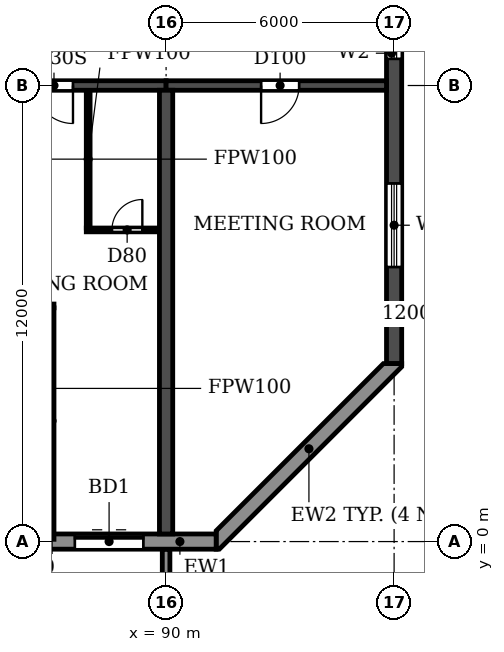
"""IFC4 building model, lengths in metres.
Left out: names, types, materials, properties, quantities, classifications, styles, units other than length and angle.
Written with IfcOpenShell. Run it as: python <this file> out.ifc"""

import sys

from ifc_helpers import new_model, si_unit, direction, frame, frame_2d, origin, place, context, subcontext, project, spatial, polyline, rectangle, outline, extrude, source, transform, mapped, element, fill, save


model = new_model("IFC4")
c1 = context("Model", 3, precision=1e-05, world=origin(), true_north=direction((0.0, 1.0)))
c2 = subcontext(c1, "Body", "Model", "MODEL_VIEW")
j1 = project(units=[si_unit("LENGTHUNIT", "METRE"), si_unit("PLANEANGLEUNIT", "RADIAN")], contexts=[c1])
p1 = place(None, origin())
s1 = spatial("IfcSite", under=j1, at=p1, CompositionType="ELEMENT")
p2 = place(p1, origin())
s2 = spatial("IfcBuilding", under=s1, at=p2, CompositionType="ELEMENT")
p3 = place(p2, frame((0.0, 0.0, 102.6)))
s3 = spatial("IfcBuildingStorey", under=s2, at=p3, CompositionType="ELEMENT", Elevation=102.6)
p4 = place(p3, frame((90.0, 0.2, 0.0), z_axis=(0.0, 0.0, 1.0), x_axis=(0.0, 1.0, 0.0)))
e1 = element("IfcWall", 1, at=p4, inside=s3, PredefinedType="SHEAR", context=c2, shape_type="SweptSolid", body=[
    extrude(rectangle(XDim=11.675, YDim=0.35, at=frame_2d((5.837, 0.0))), origin(), (0.0, 0.0, 1.0), 3.0),
])
p5 = place(p3, frame((96.0, 4.683, 0.0), z_axis=(0.0, 0.0, 1.0), x_axis=(0.0, 1.0, 0.0)))
e2 = element("IfcWall", 2, at=p5, inside=s3, PredefinedType="SHEAR", context=c2, shape_type="SweptSolid", body=[
    extrude(rectangle(XDim=34.234, YDim=0.4, at=frame_2d((17.117, 0.0))), origin(), (0.0, 0.0, 1.0), 3.0),
])
p6 = place(p5, frame((15.917, 0.0, 0.9)))
e3 = element("IfcOpeningElement", 3, at=p6, cuts=e2, PredefinedType="OPENING", context=c2, shape_type="SweptSolid", body=[
    extrude(rectangle(XDim=1.2, YDim=1.5, at=frame_2d((0.6, 0.75))), frame((0.0, 0.21, 0.0), z_axis=(0.0, -1.0, 0.0), x_axis=(1.0, 0.0, 0.0)), (0.0, 0.0, 1.0), 0.42),
])
p7 = place(p5, frame((23.817, 0.0, 0.9)))
e4 = element("IfcOpeningElement", 4, at=p7, cuts=e2, PredefinedType="OPENING", context=c2, shape_type="SweptSolid", body=[
    extrude(rectangle(XDim=1.2, YDim=1.5, at=frame_2d((0.6, 0.75))), frame((0.0, 0.21, 0.0), z_axis=(0.0, -1.0, 0.0), x_axis=(1.0, 0.0, 0.0)), (0.0, 0.0, 1.0), 0.42),
])
p8 = place(p5, frame((8.017, 0.0, 0.9)))
e5 = element("IfcOpeningElement", 5, at=p8, cuts=e2, PredefinedType="OPENING", context=c2, shape_type="SweptSolid", body=[
    extrude(rectangle(XDim=1.2, YDim=1.5, at=frame_2d((0.6, 0.75))), frame((0.0, 0.21, 0.0), z_axis=(0.0, -1.0, 0.0), x_axis=(1.0, 0.0, 0.0)), (0.0, 0.0, 1.0), 0.42),
])
p9 = place(p5, frame((28.894, 0.0, 0.6)))
e6 = element("IfcOpeningElement", 6, at=p9, cuts=e2, PredefinedType="OPENING", context=c2, shape_type="SweptSolid", body=[
    extrude(rectangle(XDim=2.2, YDim=1.8, at=frame_2d((1.1, 0.9))), frame((0.0, 0.21, 0.0), z_axis=(0.0, -1.0, 0.0), x_axis=(1.0, 0.0, 0.0)), (0.0, 0.0, 1.0), 0.42),
])
p10 = place(p5, frame((2.541, 0.0, 0.6)))
e7 = element("IfcOpeningElement", 7, at=p10, cuts=e2, PredefinedType="OPENING", context=c2, shape_type="SweptSolid", body=[
    extrude(rectangle(XDim=2.2, YDim=1.8, at=frame_2d((1.1, 0.9))), frame((0.0, 0.21, 0.0), z_axis=(0.0, -1.0, 0.0), x_axis=(1.0, 0.0, 0.0)), (0.0, 0.0, 1.0), 0.42),
])
p11 = place(p3, frame((84.0, 12.0, 0.0), z_axis=(0.0, 0.0, 1.0), x_axis=(1.0, 0.0, 0.0)))
e8 = element("IfcWall", 8, at=p11, inside=s3, PredefinedType="SHEAR", context=c2, shape_type="SweptSolid", body=[
    extrude(rectangle(XDim=6.0, YDim=0.25, at=frame_2d((3.0, 0.0))), origin(), (0.0, 0.0, 1.0), 2.4),
])
p12 = place(p11, frame((2.55, 0.0, 0.0)))
e9 = element("IfcOpeningElement", 9, at=p12, cuts=e8, PredefinedType="OPENING", context=c2, shape_type="SweptSolid", body=[
    extrude(rectangle(XDim=1.0, YDim=2.1, at=frame_2d((0.5, 1.05))), frame((0.0, 0.135, 0.0), z_axis=(0.0, -1.0, 0.0), x_axis=(1.0, 0.0, 0.0)), (0.0, 0.0, 1.0), 0.27),
])
p13 = place(p3, frame((90.0, 12.0, 0.0), z_axis=(0.0, 0.0, 1.0), x_axis=(1.0, 0.0, 0.0)))
e10 = element("IfcWall", 10, at=p13, inside=s3, PredefinedType="SHEAR", context=c2, shape_type="SweptSolid", body=[
    extrude(rectangle(XDim=5.8, YDim=0.25, at=frame_2d((2.9, 0.0))), origin(), (0.0, 0.0, 1.0), 2.4),
])
p14 = place(p13, frame((2.5, 0.0, 0.0)))
e11 = element("IfcOpeningElement", 11, at=p14, cuts=e10, PredefinedType="OPENING", context=c2, shape_type="SweptSolid", body=[
    extrude(rectangle(XDim=1.0, YDim=2.1, at=frame_2d((0.5, 1.05))), frame((0.0, 0.135, 0.0), z_axis=(0.0, -1.0, 0.0), x_axis=(1.0, 0.0, 0.0)), (0.0, 0.0, 1.0), 0.27),
])
p15 = place(p3, frame((10.683, 0.0, 0.0), z_axis=(0.0, 0.0, 1.0), x_axis=(1.0, 0.0, 0.0)))
e12 = element("IfcWall", 12, at=p15, inside=s3, PredefinedType="STANDARD", context=c2, shape_type="SweptSolid", body=[
    extrude(rectangle(XDim=80.634, YDim=0.4, at=frame_2d((40.317, 0.0))), origin(), (0.0, 0.0, 1.0), 3.0),
])
p16 = place(p15, frame((1.717, 0.0, 0.9)))
e13 = element("IfcOpeningElement", 13, at=p16, cuts=e12, PredefinedType="OPENING", context=c2, shape_type="SweptSolid", body=[
    extrude(rectangle(XDim=2.2, YDim=1.5, at=frame_2d((1.1, 0.75))), frame((0.0, 0.21, 0.0), z_axis=(0.0, -1.0, 0.0), x_axis=(1.0, 0.0, 0.0)), (0.0, 0.0, 1.0), 0.42),
])
p17 = place(p15, frame((4.917, 0.0, 0.0)))
e14 = element("IfcOpeningElement", 14, at=p17, cuts=e12, PredefinedType="OPENING", context=c2, shape_type="SweptSolid", body=[
    extrude(rectangle(XDim=1.8, YDim=2.4, at=frame_2d((0.9, 1.2))), frame((0.0, 0.21, 0.0), z_axis=(0.0, -1.0, 0.0), x_axis=(1.0, 0.0, 0.0)), (0.0, 0.0, 1.0), 0.42),
])
p18 = place(p15, frame((7.717, 0.0, 0.9)))
e15 = element("IfcOpeningElement", 15, at=p18, cuts=e12, PredefinedType="OPENING", context=c2, shape_type="SweptSolid", body=[
    extrude(rectangle(XDim=2.2, YDim=1.5, at=frame_2d((1.1, 0.75))), frame((0.0, 0.21, 0.0), z_axis=(0.0, -1.0, 0.0), x_axis=(1.0, 0.0, 0.0)), (0.0, 0.0, 1.0), 0.42),
])
p19 = place(p15, frame((10.717, 0.0, 0.9)))
e16 = element("IfcOpeningElement", 16, at=p19, cuts=e12, PredefinedType="OPENING", context=c2, shape_type="SweptSolid", body=[
    extrude(rectangle(XDim=2.2, YDim=1.5, at=frame_2d((1.1, 0.75))), frame((0.0, 0.21, 0.0), z_axis=(0.0, -1.0, 0.0), x_axis=(1.0, 0.0, 0.0)), (0.0, 0.0, 1.0), 0.42),
])
p20 = place(p15, frame((13.717, 0.0, 0.9)))
e17 = element("IfcOpeningElement", 17, at=p20, cuts=e12, PredefinedType="OPENING", context=c2, shape_type="SweptSolid", body=[
    extrude(rectangle(XDim=2.2, YDim=1.5, at=frame_2d((1.1, 0.75))), frame((0.0, 0.21, 0.0), z_axis=(0.0, -1.0, 0.0), x_axis=(1.0, 0.0, 0.0)), (0.0, 0.0, 1.0), 0.42),
])
p21 = place(p15, frame((16.717, 0.0, 0.9)))
e18 = element("IfcOpeningElement", 18, at=p21, cuts=e12, PredefinedType="OPENING", context=c2, shape_type="SweptSolid", body=[
    extrude(rectangle(XDim=2.2, YDim=1.5, at=frame_2d((1.1, 0.75))), frame((0.0, 0.21, 0.0), z_axis=(0.0, -1.0, 0.0), x_axis=(1.0, 0.0, 0.0)), (0.0, 0.0, 1.0), 0.42),
])
p22 = place(p15, frame((19.717, 0.0, 0.9)))
e19 = element("IfcOpeningElement", 19, at=p22, cuts=e12, PredefinedType="OPENING", context=c2, shape_type="SweptSolid", body=[
    extrude(rectangle(XDim=2.2, YDim=1.5, at=frame_2d((1.1, 0.75))), frame((0.0, 0.21, 0.0), z_axis=(0.0, -1.0, 0.0), x_axis=(1.0, 0.0, 0.0)), (0.0, 0.0, 1.0), 0.42),
])
p23 = place(p15, frame((22.717, 0.0, 0.9)))
e20 = element("IfcOpeningElement", 20, at=p23, cuts=e12, PredefinedType="OPENING", context=c2, shape_type="SweptSolid", body=[
    extrude(rectangle(XDim=2.2, YDim=1.5, at=frame_2d((1.1, 0.75))), frame((0.0, 0.21, 0.0), z_axis=(0.0, -1.0, 0.0), x_axis=(1.0, 0.0, 0.0)), (0.0, 0.0, 1.0), 0.42),
])
p24 = place(p15, frame((25.717, 0.0, 0.9)))
e21 = element("IfcOpeningElement", 21, at=p24, cuts=e12, PredefinedType="OPENING", context=c2, shape_type="SweptSolid", body=[
    extrude(rectangle(XDim=2.2, YDim=1.5, at=frame_2d((1.1, 0.75))), frame((0.0, 0.21, 0.0), z_axis=(0.0, -1.0, 0.0), x_axis=(1.0, 0.0, 0.0)), (0.0, 0.0, 1.0), 0.42),
])
p25 = place(p15, frame((28.917, 0.0, 0.0)))
e22 = element("IfcOpeningElement", 22, at=p25, cuts=e12, PredefinedType="OPENING", context=c2, shape_type="SweptSolid", body=[
    extrude(rectangle(XDim=1.8, YDim=2.4, at=frame_2d((0.9, 1.2))), frame((0.0, 0.21, 0.0), z_axis=(0.0, -1.0, 0.0), x_axis=(1.0, 0.0, 0.0)), (0.0, 0.0, 1.0), 0.42),
])
p26 = place(p15, frame((31.717, 0.0, 0.9)))
e23 = element("IfcOpeningElement", 23, at=p26, cuts=e12, PredefinedType="OPENING", context=c2, shape_type="SweptSolid", body=[
    extrude(rectangle(XDim=2.2, YDim=1.5, at=frame_2d((1.1, 0.75))), frame((0.0, 0.21, 0.0), z_axis=(0.0, -1.0, 0.0), x_axis=(1.0, 0.0, 0.0)), (0.0, 0.0, 1.0), 0.42),
])
p27 = place(p15, frame((34.717, 0.0, 0.9)))
e24 = element("IfcOpeningElement", 24, at=p27, cuts=e12, PredefinedType="OPENING", context=c2, shape_type="SweptSolid", body=[
    extrude(rectangle(XDim=2.2, YDim=1.5, at=frame_2d((1.1, 0.75))), frame((0.0, 0.21, 0.0), z_axis=(0.0, -1.0, 0.0), x_axis=(1.0, 0.0, 0.0)), (0.0, 0.0, 1.0), 0.42),
])
p28 = place(p15, frame((37.717, 0.0, 0.9)))
e25 = element("IfcOpeningElement", 25, at=p28, cuts=e12, PredefinedType="OPENING", context=c2, shape_type="SweptSolid", body=[
    extrude(rectangle(XDim=2.2, YDim=1.5, at=frame_2d((1.1, 0.75))), frame((0.0, 0.21, 0.0), z_axis=(0.0, -1.0, 0.0), x_axis=(1.0, 0.0, 0.0)), (0.0, 0.0, 1.0), 0.42),
])
p29 = place(p15, frame((40.717, 0.0, 0.9)))
e26 = element("IfcOpeningElement", 26, at=p29, cuts=e12, PredefinedType="OPENING", context=c2, shape_type="SweptSolid", body=[
    extrude(rectangle(XDim=2.2, YDim=1.5, at=frame_2d((1.1, 0.75))), frame((0.0, 0.21, 0.0), z_axis=(0.0, -1.0, 0.0), x_axis=(1.0, 0.0, 0.0)), (0.0, 0.0, 1.0), 0.42),
])
p30 = place(p15, frame((43.717, 0.0, 0.9)))
e27 = element("IfcOpeningElement", 27, at=p30, cuts=e12, PredefinedType="OPENING", context=c2, shape_type="SweptSolid", body=[
    extrude(rectangle(XDim=2.2, YDim=1.5, at=frame_2d((1.1, 0.75))), frame((0.0, 0.21, 0.0), z_axis=(0.0, -1.0, 0.0), x_axis=(1.0, 0.0, 0.0)), (0.0, 0.0, 1.0), 0.42),
])
p31 = place(p15, frame((46.717, 0.0, 0.9)))
e28 = element("IfcOpeningElement", 28, at=p31, cuts=e12, PredefinedType="OPENING", context=c2, shape_type="SweptSolid", body=[
    extrude(rectangle(XDim=2.2, YDim=1.5, at=frame_2d((1.1, 0.75))), frame((0.0, 0.21, 0.0), z_axis=(0.0, -1.0, 0.0), x_axis=(1.0, 0.0, 0.0)), (0.0, 0.0, 1.0), 0.42),
])
p32 = place(p15, frame((49.917, 0.0, 0.0)))
e29 = element("IfcOpeningElement", 29, at=p32, cuts=e12, PredefinedType="OPENING", context=c2, shape_type="SweptSolid", body=[
    extrude(rectangle(XDim=1.8, YDim=2.4, at=frame_2d((0.9, 1.2))), frame((0.0, 0.21, 0.0), z_axis=(0.0, -1.0, 0.0), x_axis=(1.0, 0.0, 0.0)), (0.0, 0.0, 1.0), 0.42),
])
p33 = place(p15, frame((52.717, 0.0, 0.9)))
e30 = element("IfcOpeningElement", 30, at=p33, cuts=e12, PredefinedType="OPENING", context=c2, shape_type="SweptSolid", body=[
    extrude(rectangle(XDim=2.2, YDim=1.5, at=frame_2d((1.1, 0.75))), frame((0.0, 0.21, 0.0), z_axis=(0.0, -1.0, 0.0), x_axis=(1.0, 0.0, 0.0)), (0.0, 0.0, 1.0), 0.42),
])
p34 = place(p15, frame((55.717, 0.0, 0.9)))
e31 = element("IfcOpeningElement", 31, at=p34, cuts=e12, PredefinedType="OPENING", context=c2, shape_type="SweptSolid", body=[
    extrude(rectangle(XDim=2.2, YDim=1.5, at=frame_2d((1.1, 0.75))), frame((0.0, 0.21, 0.0), z_axis=(0.0, -1.0, 0.0), x_axis=(1.0, 0.0, 0.0)), (0.0, 0.0, 1.0), 0.42),
])
p35 = place(p15, frame((58.717, 0.0, 0.9)))
e32 = element("IfcOpeningElement", 32, at=p35, cuts=e12, PredefinedType="OPENING", context=c2, shape_type="SweptSolid", body=[
    extrude(rectangle(XDim=2.2, YDim=1.5, at=frame_2d((1.1, 0.75))), frame((0.0, 0.21, 0.0), z_axis=(0.0, -1.0, 0.0), x_axis=(1.0, 0.0, 0.0)), (0.0, 0.0, 1.0), 0.42),
])
p36 = place(p15, frame((61.717, 0.0, 0.9)))
e33 = element("IfcOpeningElement", 33, at=p36, cuts=e12, PredefinedType="OPENING", context=c2, shape_type="SweptSolid", body=[
    extrude(rectangle(XDim=2.2, YDim=1.5, at=frame_2d((1.1, 0.75))), frame((0.0, 0.21, 0.0), z_axis=(0.0, -1.0, 0.0), x_axis=(1.0, 0.0, 0.0)), (0.0, 0.0, 1.0), 0.42),
])
p37 = place(p15, frame((64.717, 0.0, 0.9)))
e34 = element("IfcOpeningElement", 34, at=p37, cuts=e12, PredefinedType="OPENING", context=c2, shape_type="SweptSolid", body=[
    extrude(rectangle(XDim=2.2, YDim=1.5, at=frame_2d((1.1, 0.75))), frame((0.0, 0.21, 0.0), z_axis=(0.0, -1.0, 0.0), x_axis=(1.0, 0.0, 0.0)), (0.0, 0.0, 1.0), 0.42),
])
p38 = place(p15, frame((67.717, 0.0, 0.9)))
e35 = element("IfcOpeningElement", 35, at=p38, cuts=e12, PredefinedType="OPENING", context=c2, shape_type="SweptSolid", body=[
    extrude(rectangle(XDim=2.2, YDim=1.5, at=frame_2d((1.1, 0.75))), frame((0.0, 0.21, 0.0), z_axis=(0.0, -1.0, 0.0), x_axis=(1.0, 0.0, 0.0)), (0.0, 0.0, 1.0), 0.42),
])
p39 = place(p15, frame((70.717, 0.0, 0.9)))
e36 = element("IfcOpeningElement", 36, at=p39, cuts=e12, PredefinedType="OPENING", context=c2, shape_type="SweptSolid", body=[
    extrude(rectangle(XDim=2.2, YDim=1.5, at=frame_2d((1.1, 0.75))), frame((0.0, 0.21, 0.0), z_axis=(0.0, -1.0, 0.0), x_axis=(1.0, 0.0, 0.0)), (0.0, 0.0, 1.0), 0.42),
])
p40 = place(p15, frame((73.717, 0.0, 0.9)))
e37 = element("IfcOpeningElement", 37, at=p40, cuts=e12, PredefinedType="OPENING", context=c2, shape_type="SweptSolid", body=[
    extrude(rectangle(XDim=2.2, YDim=1.5, at=frame_2d((1.1, 0.75))), frame((0.0, 0.21, 0.0), z_axis=(0.0, -1.0, 0.0), x_axis=(1.0, 0.0, 0.0)), (0.0, 0.0, 1.0), 0.42),
])
p41 = place(p15, frame((76.917, 0.0, 0.0)))
e38 = element("IfcOpeningElement", 38, at=p41, cuts=e12, PredefinedType="OPENING", context=c2, shape_type="SweptSolid", body=[
    extrude(rectangle(XDim=1.8, YDim=2.4, at=frame_2d((0.9, 1.2))), frame((0.0, 0.21, 0.0), z_axis=(0.0, -1.0, 0.0), x_axis=(1.0, 0.0, 0.0)), (0.0, 0.0, 1.0), 0.42),
])
p42 = place(p3, origin())
e39 = element("IfcWall", 39, at=p42, inside=s3, PredefinedType="STANDARD", context=c2, shape_type="SweptSolid", body=[
    extrude(outline(polyline([(91.317, -0.2), (91.4, -0.2), (96.2, 4.6), (96.2, 4.683), (95.717, 4.683), (91.317, 0.283), (91.317, -0.2)])), origin(), (0.0, 0.0, 1.0), 3.0),
])
m1 = source(origin(), c2, "Body", "SweptSolid", [
    extrude(outline(polyline([(0.0, 0.0), (0.2, 0.0), (0.2, 1.65), (0.0, 1.65), (0.0, 0.0)])), origin(), (0.0, 0.0, 1.0), 3.1),
])
p43 = place(p3, frame((89.9, -1.85, 0.0)))
e40 = element("IfcWall", 40, at=p43, inside=s3, PredefinedType="STANDARD", context=c2, shape_type="MappedRepresentation", body=[
    mapped(m1, transform((0.0, 0.0, 0.0))),
])
p44 = place(p3, frame((84.185, 6.2, 0.0), z_axis=(0.0, 0.0, 1.0), x_axis=(1.0, 0.0, 0.0)))
e41 = element("IfcWall", 41, at=p44, inside=s3, PredefinedType="PARTITIONING", context=c2, shape_type="SweptSolid", body=[
    extrude(rectangle(XDim=2.865, YDim=0.1, at=frame_2d((1.433, 0.0))), origin(), (0.0, 0.0, 1.0), 3.0),
])
p45 = place(p44, frame((0.315, 0.0, 0.0)))
e42 = element("IfcOpeningElement", 42, at=p45, cuts=e41, PredefinedType="OPENING", context=c2, shape_type="SweptSolid", body=[
    extrude(rectangle(XDim=0.9, YDim=2.1, at=frame_2d((0.45, 1.05))), frame((0.0, 0.06, 0.0), z_axis=(0.0, -1.0, 0.0), x_axis=(1.0, 0.0, 0.0)), (0.0, 0.0, 1.0), 0.12),
])
p46 = place(p3, frame((87.9, 8.2, 0.0), z_axis=(0.0, 0.0, 1.0), x_axis=(1.0, 0.0, 0.0)))
e43 = element("IfcWall", 43, at=p46, inside=s3, PredefinedType="PARTITIONING", context=c2, shape_type="SweptSolid", body=[
    extrude(rectangle(XDim=1.915, YDim=0.1, at=frame_2d((0.958, 0.0))), origin(), (0.0, 0.0, 1.0), 3.0),
])
p47 = place(p46, frame((0.675, 0.0, 0.0)))
e44 = element("IfcOpeningElement", 44, at=p47, cuts=e43, PredefinedType="OPENING", context=c2, shape_type="SweptSolid", body=[
    extrude(rectangle(XDim=0.8, YDim=2.1, at=frame_2d((0.4, 1.05))), frame((0.0, 0.06, 0.0), z_axis=(0.0, -1.0, 0.0), x_axis=(1.0, 0.0, 0.0)), (0.0, 0.0, 1.0), 0.12),
])
p48 = place(p3, frame((87.0, 0.06, 0.0), z_axis=(0.0, 0.0, 1.0), x_axis=(0.0, 1.0, 0.0)))
e45 = element("IfcWall", 45, at=p48, inside=s3, PredefinedType="PARTITIONING", context=c2, shape_type="SweptSolid", body=[
    extrude(rectangle(XDim=6.09, YDim=0.1, at=frame_2d((3.045, 0.0))), origin(), (0.0, 0.0, 1.0), 3.0),
])
p49 = place(p3, frame((87.95, 8.25, 0.0), z_axis=(0.0, 0.0, 1.0), x_axis=(0.0, 1.0, 0.0)))
e46 = element("IfcWall", 46, at=p49, inside=s3, PredefinedType="PARTITIONING", context=c2, shape_type="SweptSolid", body=[
    extrude(rectangle(XDim=3.615, YDim=0.1, at=frame_2d((1.808, 0.0))), origin(), (0.0, 0.0, 1.0), 3.0),
])
p50 = place(p41, origin())
e47 = element("IfcDoor", 47, at=p50, inside=s3, OperationType="DOUBLE_DOOR_SLIDING", PredefinedType="DOOR", context=c2, shape_type="SweptSolid", body=[
    extrude(rectangle(XDim=1.8, YDim=2.4, at=frame_2d((0.9, 1.2))), frame((0.0, 0.025, 0.0), z_axis=(0.0, -1.0, 0.0), x_axis=(1.0, 0.0, 0.0)), (0.0, 0.0, 1.0), 0.05),
])
fill(e38, e47)
p51 = place(p8, origin())
e48 = element("IfcWindow", 48, at=p51, inside=s3, PartitioningType="SINGLE_PANEL", PredefinedType="WINDOW", context=c2, shape_type="SweptSolid", body=[
    extrude(rectangle(XDim=1.2, YDim=1.5, at=frame_2d((0.6, 0.75))), frame((0.0, 0.03, 0.0), z_axis=(0.0, -1.0, 0.0), x_axis=(1.0, 0.0, 0.0)), (0.0, 0.0, 1.0), 0.06),
])
fill(e5, e48)
p52 = place(p10, origin())
e49 = element("IfcWindow", 49, at=p52, inside=s3, PartitioningType="DOUBLE_PANEL_HORIZONTAL", PredefinedType="WINDOW", context=c2, shape_type="SweptSolid", body=[
    extrude(rectangle(XDim=2.2, YDim=1.8, at=frame_2d((1.1, 0.9))), frame((0.0, 0.03, 0.0), z_axis=(0.0, -1.0, 0.0), x_axis=(1.0, 0.0, 0.0)), (0.0, 0.0, 1.0), 0.06),
])
fill(e7, e49)
p53 = place(p12, frame((1.0, 0.0, 0.0), z_axis=(0.0, 0.0, 1.0), x_axis=(-1.0, 0.0, 0.0)))
e50 = element("IfcDoor", 50, at=p53, inside=s3, OperationType="SINGLE_SWING_LEFT", PredefinedType="DOOR", context=c2, shape_type="SweptSolid", body=[
    extrude(rectangle(XDim=1.0, YDim=2.1, at=frame_2d((0.5, 1.05))), frame((0.0, 0.025, 0.0), z_axis=(0.0, -1.0, 0.0), x_axis=(1.0, 0.0, 0.0)), (0.0, 0.0, 1.0), 0.05),
])
fill(e9, e50)
p54 = place(p47, origin())
e51 = element("IfcDoor", 51, at=p54, inside=s3, OperationType="SINGLE_SWING_RIGHT", PredefinedType="DOOR", context=c2, shape_type="SweptSolid", body=[
    extrude(rectangle(XDim=0.8, YDim=2.1, at=frame_2d((0.4, 1.05))), frame((0.0, 0.025, 0.0), z_axis=(0.0, -1.0, 0.0), x_axis=(1.0, 0.0, 0.0)), (0.0, 0.0, 1.0), 0.05),
])
fill(e44, e51)
p55 = place(p14, frame((1.0, 0.0, 0.0), z_axis=(0.0, 0.0, 1.0), x_axis=(-1.0, 0.0, 0.0)))
e52 = element("IfcDoor", 52, at=p55, inside=s3, OperationType="SINGLE_SWING_RIGHT", PredefinedType="DOOR", context=c2, shape_type="SweptSolid", body=[
    extrude(rectangle(XDim=1.0, YDim=2.1, at=frame_2d((0.5, 1.05))), frame((0.0, 0.025, 0.0), z_axis=(0.0, -1.0, 0.0), x_axis=(1.0, 0.0, 0.0)), (0.0, 0.0, 1.0), 0.05),
])
fill(e11, e52)
save(model, sys.argv[1])
